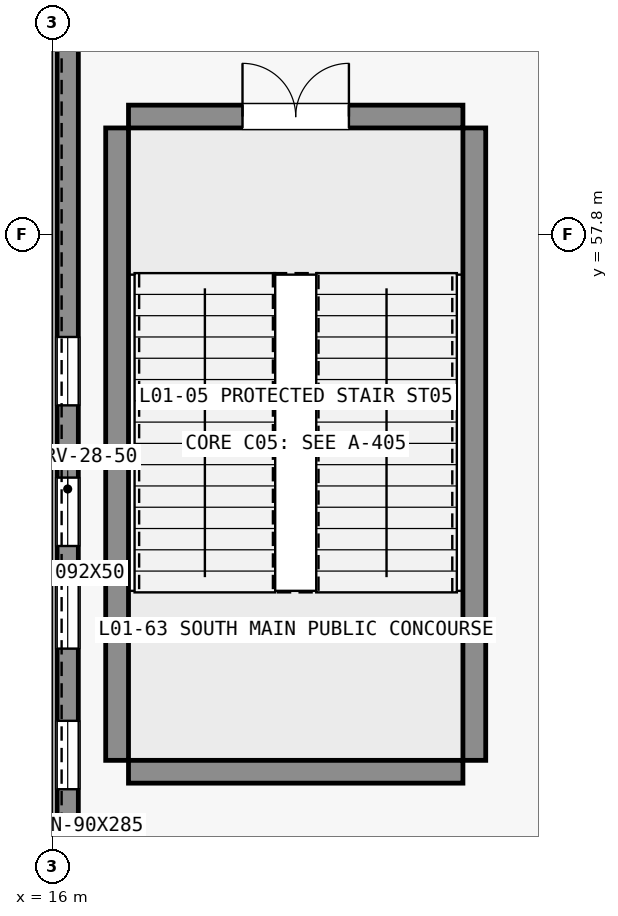
"""IFC4 building model, lengths in metres.
Left out: names, types, materials, properties, quantities, classifications, styles, units other than length and angle.
Written with IfcOpenShell. Run it as: python <this file> out.ifc"""

import sys

from ifc_helpers import new_model, si_unit, direction, frame, frame_2d, origin, place, context, subcontext, project, spatial, rectangle, extrude, element, fill, save


model = new_model("IFC4")
c1 = context("Model", 3, precision=1e-05, world=origin(), true_north=direction((0.0, 1.0)))
c2 = subcontext(c1, "Body", "Model", "MODEL_VIEW")
j1 = project(units=[si_unit("LENGTHUNIT", "METRE"), si_unit("PLANEANGLEUNIT", "RADIAN")], contexts=[c1])
p1 = place(None, origin())
s1 = spatial("IfcSite", under=j1, at=p1, CompositionType="ELEMENT")
p2 = place(p1, origin())
s2 = spatial("IfcBuilding", under=s1, at=p2, CompositionType="ELEMENT")
p3 = place(p2, frame((0.0, 0.0, 6.0)))
s3 = spatial("IfcBuildingStorey", under=s2, at=p3, CompositionType="ELEMENT", Elevation=6.0)
p4 = place(p3, frame((17.0, 50.73, 0.0), z_axis=(0.0, 0.0, 1.0), x_axis=(1.0, 0.0, 0.0)))
e1 = element("IfcWall", 1, at=p4, inside=s3, PredefinedType="SHEAR", context=c2, shape_type="SweptSolid", body=[
    extrude(rectangle(XDim=4.4, YDim=0.3, at=frame_2d((2.2, 0.0))), origin(), (0.0, 0.0, 1.0), 5.4),
])
p5 = place(p3, frame((17.0, 59.35, 0.0), z_axis=(0.0, 0.0, 1.0), x_axis=(1.0, 0.0, 0.0)))
e2 = element("IfcWall", 2, at=p5, inside=s3, PredefinedType="SHEAR", context=c2, shape_type="SweptSolid", body=[
    extrude(rectangle(XDim=4.4, YDim=0.3, at=frame_2d((2.2, 0.0))), origin(), (0.0, 0.0, 1.0), 5.4),
])
p6 = place(p5, frame((1.5, 0.0, 0.0)))
e3 = element("IfcOpeningElement", 3, at=p6, cuts=e2, PredefinedType="OPENING", context=c2, shape_type="SweptSolid", body=[
    extrude(rectangle(XDim=1.4, YDim=2.2, at=frame_2d((0.7, 1.1))), frame((0.0, 0.16, 0.0), z_axis=(0.0, -1.0, 0.0), x_axis=(1.0, 0.0, 0.0)), (0.0, 0.0, 1.0), 0.32),
])
for number, where, z_axis, x_axis in (
    (4, (16.85, 50.88, 0.0), (0.0, 0.0, 1.0), (0.0, 1.0, 0.0)),
    (5, (21.55, 50.88, 0.0), (0.0, 0.0, 1.0), (0.0, 1.0, 0.0)),
):
    element("IfcWall", number, at=place(p3, frame(where, z_axis=z_axis, x_axis=x_axis)), inside=s3, PredefinedType="SHEAR", context=c2, shape_type="SweptSolid", body=[
        extrude(rectangle(XDim=8.32, YDim=0.3, at=frame_2d((4.16, 0.0))), origin(), (0.0, 0.0, 1.0), 5.4),
    ])
p7 = place(p3, frame((16.2, 48.05, 0.0), z_axis=(0.0, 0.0, 1.0), x_axis=(0.0, 1.0, 0.0)))
e6 = element("IfcWall", 6, at=p7, inside=s3, PredefinedType="STANDARD", context=c2, shape_type="SweptSolid", body=[
    extrude(rectangle(XDim=12.8, YDim=0.28, at=frame_2d((6.4, 0.0))), origin(), (0.0, 0.0, 1.0), 5.04),
])
p8 = place(p7, frame((1.1, 0.0, 0.95)))
e7 = element("IfcOpeningElement", 7, at=p8, cuts=e6, PredefinedType="OPENING", context=c2, shape_type="SweptSolid", body=[
    extrude(rectangle(XDim=0.9, YDim=2.85, at=frame_2d((0.45, 1.425))), frame((0.0, 0.15, 0.0), z_axis=(0.0, -1.0, 0.0), x_axis=(1.0, 0.0, 0.0)), (0.0, 0.0, 1.0), 0.3),
])
p9 = place(p7, frame((2.45, 0.0, 0.95)))
e8 = element("IfcOpeningElement", 8, at=p9, cuts=e6, PredefinedType="OPENING", context=c2, shape_type="SweptSolid", body=[
    extrude(rectangle(XDim=0.9, YDim=2.85, at=frame_2d((0.45, 1.425))), frame((0.0, 0.15, 0.0), z_axis=(0.0, -1.0, 0.0), x_axis=(1.0, 0.0, 0.0)), (0.0, 0.0, 1.0), 0.3),
])
p10 = place(p7, frame((4.3, 0.0, 0.95)))
e9 = element("IfcOpeningElement", 9, at=p10, cuts=e6, PredefinedType="OPENING", context=c2, shape_type="SweptSolid", body=[
    extrude(rectangle(XDim=0.9, YDim=2.85, at=frame_2d((0.45, 1.425))), frame((0.0, 0.15, 0.0), z_axis=(0.0, -1.0, 0.0), x_axis=(1.0, 0.0, 0.0)), (0.0, 0.0, 1.0), 0.3),
])
p11 = place(p7, frame((5.65, 0.0, 0.95)))
e10 = element("IfcOpeningElement", 10, at=p11, cuts=e6, PredefinedType="OPENING", context=c2, shape_type="SweptSolid", body=[
    extrude(rectangle(XDim=0.9, YDim=2.85, at=frame_2d((0.45, 1.425))), frame((0.0, 0.15, 0.0), z_axis=(0.0, -1.0, 0.0), x_axis=(1.0, 0.0, 0.0)), (0.0, 0.0, 1.0), 0.3),
])
p12 = place(p7, frame((7.5, 0.0, 0.95)))
e11 = element("IfcOpeningElement", 11, at=p12, cuts=e6, PredefinedType="OPENING", context=c2, shape_type="SweptSolid", body=[
    extrude(rectangle(XDim=0.9, YDim=2.85, at=frame_2d((0.45, 1.425))), frame((0.0, 0.15, 0.0), z_axis=(0.0, -1.0, 0.0), x_axis=(1.0, 0.0, 0.0)), (0.0, 0.0, 1.0), 0.3),
])
p13 = place(p8, origin())
e12 = element("IfcWindow", 12, at=p13, inside=s3, PartitioningType="DOUBLE_PANEL_VERTICAL", PredefinedType="WINDOW", context=c2, shape_type="SweptSolid", body=[
    extrude(rectangle(XDim=0.9, YDim=2.85, at=frame_2d((0.45, 1.425))), frame((0.0, 0.03, 0.0), z_axis=(0.0, -1.0, 0.0), x_axis=(1.0, 0.0, 0.0)), (0.0, 0.0, 1.0), 0.06),
])
fill(e7, e12)
p14 = place(p9, origin())
e13 = element("IfcWindow", 13, at=p14, inside=s3, PartitioningType="DOUBLE_PANEL_VERTICAL", PredefinedType="WINDOW", context=c2, shape_type="SweptSolid", body=[
    extrude(rectangle(XDim=0.9, YDim=2.85, at=frame_2d((0.45, 1.425))), frame((0.0, 0.03, 0.0), z_axis=(0.0, -1.0, 0.0), x_axis=(1.0, 0.0, 0.0)), (0.0, 0.0, 1.0), 0.06),
])
fill(e8, e13)
p15 = place(p10, origin())
e14 = element("IfcWindow", 14, at=p15, inside=s3, PartitioningType="DOUBLE_PANEL_VERTICAL", PredefinedType="WINDOW", context=c2, shape_type="SweptSolid", body=[
    extrude(rectangle(XDim=0.9, YDim=2.85, at=frame_2d((0.45, 1.425))), frame((0.0, 0.03, 0.0), z_axis=(0.0, -1.0, 0.0), x_axis=(1.0, 0.0, 0.0)), (0.0, 0.0, 1.0), 0.06),
])
fill(e9, e14)
p16 = place(p11, origin())
e15 = element("IfcWindow", 15, at=p16, inside=s3, PartitioningType="DOUBLE_PANEL_VERTICAL", PredefinedType="WINDOW", context=c2, shape_type="SweptSolid", body=[
    extrude(rectangle(XDim=0.9, YDim=2.85, at=frame_2d((0.45, 1.425))), frame((0.0, 0.03, 0.0), z_axis=(0.0, -1.0, 0.0), x_axis=(1.0, 0.0, 0.0)), (0.0, 0.0, 1.0), 0.06),
])
fill(e10, e15)
p17 = place(p12, origin())
e16 = element("IfcWindow", 16, at=p17, inside=s3, PartitioningType="DOUBLE_PANEL_VERTICAL", PredefinedType="WINDOW", context=c2, shape_type="SweptSolid", body=[
    extrude(rectangle(XDim=0.9, YDim=2.85, at=frame_2d((0.45, 1.425))), frame((0.0, 0.03, 0.0), z_axis=(0.0, -1.0, 0.0), x_axis=(1.0, 0.0, 0.0)), (0.0, 0.0, 1.0), 0.06),
])
fill(e11, e16)
p18 = place(p6, origin())
e17 = element("IfcDoor", 17, at=p18, inside=s3, OperationType="DOUBLE_DOOR_SINGLE_SWING", PredefinedType="DOOR", context=c2, shape_type="SweptSolid", body=[
    extrude(rectangle(XDim=1.4, YDim=2.2, at=frame_2d((0.7, 1.1))), frame((0.0, 0.025, 0.0), z_axis=(0.0, -1.0, 0.0), x_axis=(1.0, 0.0, 0.0)), (0.0, 0.0, 1.0), 0.05),
])
fill(e3, e17)
save(model, sys.argv[1])
